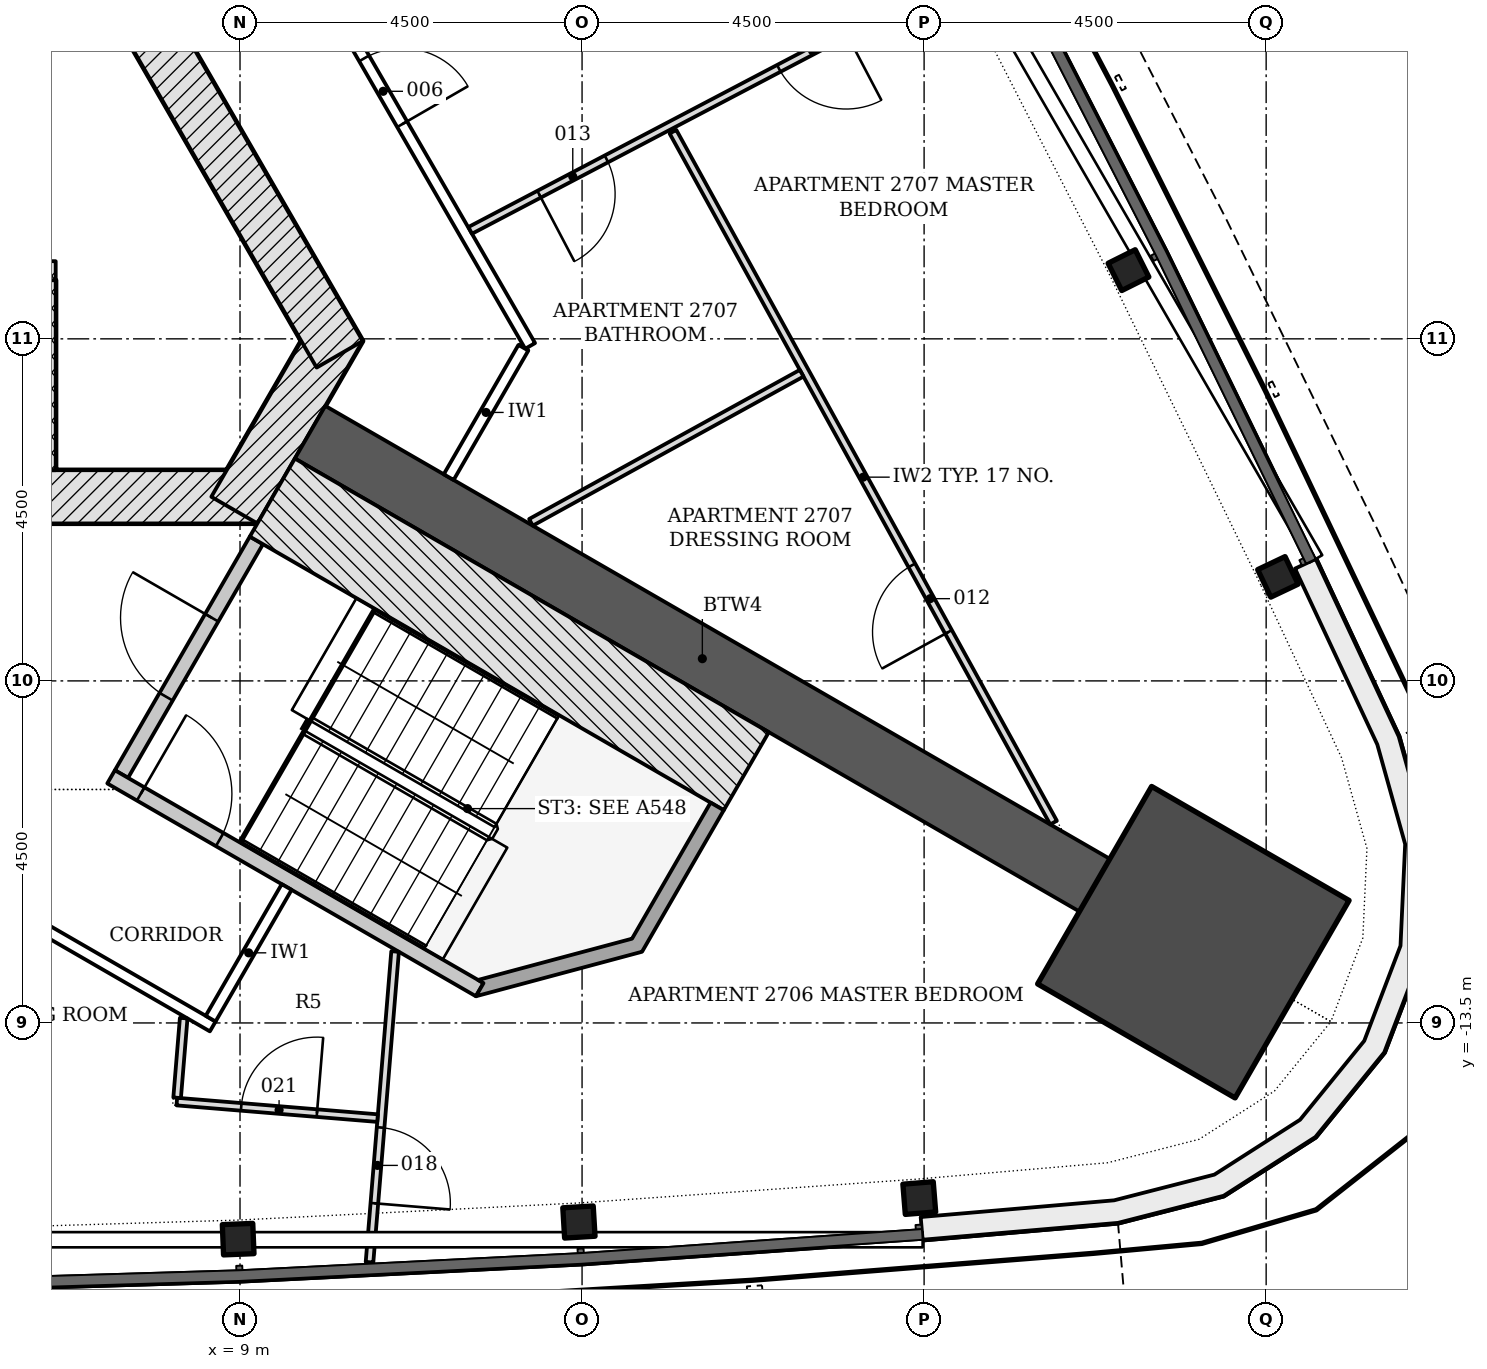
"""IFC4 building model, lengths in metres.
Left out: names, types, materials, properties, quantities, classifications, styles, units other than length and angle.
Written with IfcOpenShell. Run it as: python <this file> out.ifc"""

import sys

from ifc_helpers import new_model, si_unit, direction, frame, frame_2d, origin, origin_2d, place, context, subcontext, project, spatial, polyline, rectangle, i_section, outline, extrude, element, fill, save


model = new_model("IFC4")
c1 = context("Model", 3, precision=1e-05, world=origin(), true_north=direction((0.0, 1.0)))
c2 = subcontext(c1, "Body", "Model", "MODEL_VIEW")
j1 = project(units=[si_unit("LENGTHUNIT", "METRE"), si_unit("PLANEANGLEUNIT", "RADIAN")], contexts=[c1])
p1 = place(None, origin())
s1 = spatial("IfcSite", under=j1, at=p1, CompositionType="ELEMENT")
p2 = place(p1, origin())
s2 = spatial("IfcBuilding", under=s1, at=p2, CompositionType="ELEMENT")
p3 = place(p2, frame((0.0, 0.0, 105.9)))
s3 = spatial("IfcBuildingStorey", under=s2, at=p3, CompositionType="ELEMENT", Elevation=105.9)
p4 = place(p3, frame((-9.229, -6.578, -0.2), z_axis=(0.0, 0.0, 1.0), x_axis=(1.0, 0.0, 0.0)))
e1 = element("IfcWall", 1, at=p4, inside=s3, PredefinedType="SHEAR", context=c2, shape_type="SweptSolid", body=[
    extrude(rectangle(XDim=18.458, YDim=0.7, at=frame_2d((9.229, 0.0))), origin(), (0.0, 0.0, 1.0), 3.6),
])
p5 = place(p4, frame((3.304, 0.0, 0.2)))
e2 = element("IfcOpeningElement", 2, at=p5, cuts=e1, PredefinedType="OPENING", context=c2, shape_type="SweptSolid", body=[
    extrude(rectangle(XDim=1.1, YDim=2.1, at=frame_2d((0.55, 1.05))), frame((0.0, 0.36, 0.0), z_axis=(0.0, -1.0, 0.0), x_axis=(1.0, 0.0, 0.0)), (0.0, 0.0, 1.0), 0.72),
])
p6 = place(p4, frame((5.454, 0.0, 0.2)))
e3 = element("IfcOpeningElement", 3, at=p6, cuts=e1, PredefinedType="OPENING", context=c2, shape_type="SweptSolid", body=[
    extrude(rectangle(XDim=1.1, YDim=2.1, at=frame_2d((0.55, 1.05))), frame((0.0, 0.36, 0.0), z_axis=(0.0, -1.0, 0.0), x_axis=(1.0, 0.0, 0.0)), (0.0, 0.0, 1.0), 0.72),
])
p7 = place(p4, frame((7.604, 0.0, 0.2)))
e4 = element("IfcOpeningElement", 4, at=p7, cuts=e1, PredefinedType="OPENING", context=c2, shape_type="SweptSolid", body=[
    extrude(rectangle(XDim=1.1, YDim=2.1, at=frame_2d((0.55, 1.05))), frame((0.0, 0.36, 0.0), z_axis=(0.0, -1.0, 0.0), x_axis=(1.0, 0.0, 0.0)), (0.0, 0.0, 1.0), 0.72),
])
p8 = place(p4, frame((9.754, 0.0, 0.2)))
e5 = element("IfcOpeningElement", 5, at=p8, cuts=e1, PredefinedType="OPENING", context=c2, shape_type="SweptSolid", body=[
    extrude(rectangle(XDim=1.1, YDim=2.1, at=frame_2d((0.55, 1.05))), frame((0.0, 0.36, 0.0), z_axis=(0.0, -1.0, 0.0), x_axis=(1.0, 0.0, 0.0)), (0.0, 0.0, 1.0), 0.72),
])
p9 = place(p4, frame((11.904, 0.0, 0.2)))
e6 = element("IfcOpeningElement", 6, at=p9, cuts=e1, PredefinedType="OPENING", context=c2, shape_type="SweptSolid", body=[
    extrude(rectangle(XDim=1.1, YDim=2.1, at=frame_2d((0.55, 1.05))), frame((0.0, 0.36, 0.0), z_axis=(0.0, -1.0, 0.0), x_axis=(1.0, 0.0, 0.0)), (0.0, 0.0, 1.0), 0.72),
])
p10 = place(p4, frame((14.054, 0.0, 0.2)))
e7 = element("IfcOpeningElement", 7, at=p10, cuts=e1, PredefinedType="OPENING", context=c2, shape_type="SweptSolid", body=[
    extrude(rectangle(XDim=1.1, YDim=2.1, at=frame_2d((0.55, 1.05))), frame((0.0, 0.36, 0.0), z_axis=(0.0, -1.0, 0.0), x_axis=(1.0, 0.0, 0.0)), (0.0, 0.0, 1.0), 0.72),
])
p11 = place(p4, frame((1.029, 0.0, 0.2)))
e8 = element("IfcOpeningElement", 8, at=p11, cuts=e1, PredefinedType="OPENING", context=c2, shape_type="SweptSolid", body=[
    extrude(rectangle(XDim=1.0, YDim=2.1, at=frame_2d((0.5, 1.05))), frame((0.0, 0.36, 0.0), z_axis=(0.0, -1.0, 0.0), x_axis=(1.0, 0.0, 0.0)), (0.0, 0.0, 1.0), 0.72),
])
p12 = place(p3, frame((8.926, -6.753, -0.2), z_axis=(0.0, 0.0, 1.0), x_axis=(0.500042739161, 0.866000726912, 0.0)))
e9 = element("IfcWall", 9, at=p12, inside=s3, PredefinedType="SHEAR", context=c2, shape_type="SweptSolid", body=[
    extrude(rectangle(XDim=2.771, YDim=0.7, at=frame_2d((1.386, 0.0))), origin(), (0.0, 0.0, 1.0), 3.6),
])
p13 = place(p3, frame((10.311, -4.703, -0.2), z_axis=(0.0, 0.0, 1.0), x_axis=(-0.500001446645, 0.866024568562, 0.0)))
e10 = element("IfcWall", 10, at=p13, inside=s3, PredefinedType="SHEAR", context=c2, shape_type="SweptSolid", body=[
    extrude(rectangle(XDim=18.458, YDim=0.7, at=frame_2d((9.229, 0.0))), origin(), (0.0, 0.0, 1.0), 3.6),
])
p14 = place(p13, frame((10.5, 0.0, 0.2)))
e11 = element("IfcOpeningElement", 11, at=p14, cuts=e10, PredefinedType="OPENING", context=c2, shape_type="SweptSolid", body=[
    extrude(rectangle(XDim=1.0, YDim=2.1, at=frame_2d((0.5, 1.05))), frame((0.0, 0.36, 0.0), z_axis=(0.0, -1.0, 0.0), x_axis=(1.0, 0.0, 0.0)), (0.0, 0.0, 1.0), 0.72),
])
p15 = place(p13, frame((4.877, 0.0, 0.2)))
e12 = element("IfcOpeningElement", 12, at=p15, cuts=e10, PredefinedType="OPENING", context=c2, shape_type="SweptSolid", body=[
    extrude(rectangle(XDim=0.9, YDim=2.1, at=frame_2d((0.45, 1.05))), frame((0.0, 0.36, 0.0), z_axis=(0.0, -1.0, 0.0), x_axis=(1.0, 0.0, 0.0)), (0.0, 0.0, 1.0), 0.72),
])
p16 = place(p13, frame((14.452, 0.0, 0.2)))
e13 = element("IfcOpeningElement", 13, at=p16, cuts=e10, PredefinedType="OPENING", context=c2, shape_type="SweptSolid", body=[
    extrude(rectangle(XDim=0.9, YDim=2.1, at=frame_2d((0.45, 1.05))), frame((0.0, 0.36, 0.0), z_axis=(0.0, -1.0, 0.0), x_axis=(1.0, 0.0, 0.0)), (0.0, 0.0, 1.0), 0.72),
])
p17 = place(p3, frame((9.922, -5.728, -0.2), z_axis=(0.0, 0.0, 1.0), x_axis=(0.866027307971, -0.499996701837, 0.0)))
e14 = element("IfcWall", 14, at=p17, inside=s3, PredefinedType="SHEAR", context=c2, shape_type="SweptSolid", body=[
    extrude(rectangle(XDim=11.918, YDim=0.8, at=frame_2d((5.959, 0.0))), origin(), (0.0, 0.0, 1.0), 3.6),
])
p18 = place(p3, frame((21.542, -12.438, -0.2), z_axis=(0.0, 0.0, 1.0), x_axis=(0.866025403784, -0.5, 0.0)))
e15 = element("IfcColumn", 15, at=p18, inside=s3, PredefinedType="COLUMN", context=c2, shape_type="SweptSolid", body=[
    extrude(rectangle(XDim=3.0, YDim=3.0, at=origin_2d()), origin(), (0.0, 0.0, 1.0), 3.6),
])
for number, where, z_axis, x_axis in (
    (16, (8.976, -16.344, -0.2), (0.0, 0.0, 1.0), (0.999, 0.04, 0.0)),
    (17, (13.459, -16.119, -0.2), (0.0, 0.0, 1.0), (0.998, 0.06, 0.0)),
    (18, (17.937, -15.804, -0.2), (0.0, 0.0, 1.0), (0.997, 0.08, 0.0)),
    (19, (22.655, -7.632, -0.2), (0.0, 0.0, 1.0), (-0.429, 0.903, 0.0)),
    (20, (20.689, -3.596, -0.2), (0.0, 0.0, 1.0), (-0.447, 0.895, 0.0)),
):
    element("IfcColumn", number, at=place(p3, frame(where, z_axis=z_axis, x_axis=x_axis)), inside=s3, PredefinedType="COLUMN", context=c2, shape_type="SweptSolid", body=[
        extrude(i_section(OverallWidth=0.401, OverallDepth=0.399, WebThickness=0.025, FlangeThickness=0.04, FilletRadius=0.015, at=origin_2d()), origin(), (0.0, 0.0, 1.0), 3.6),
    ])
p19 = place(p3, origin())
e21 = element("IfcWall", 21, at=p19, inside=s3, PredefinedType="NOTDEFINED", context=c2, shape_type="SweptSolid", body=[
    extrude(outline(polyline([(17.981, -16.352), (20.551, -16.13), (21.94, -15.774), (23.148, -15.0), (24.054, -13.887), (24.565, -12.547), (24.631, -11.114), (24.245, -9.732), (23.152, -7.396), (22.88, -7.523), (23.962, -9.837), (24.329, -11.148), (24.267, -12.485), (23.791, -13.735), (22.946, -14.774), (21.819, -15.495), (20.5, -15.833), (17.955, -16.053), (17.981, -16.352)])), origin(), (0.0, 0.0, 1.0), 3.3),
])
p20 = place(p3, frame((6.45, -6.228, -0.2), z_axis=(0.0, 0.0, 1.0), x_axis=(0.0, 1.0, 0.0)))
e22 = element("IfcWall", 22, at=p20, inside=s3, PredefinedType="PARTITIONING", context=c2, shape_type="SweptSolid", body=[
    extrude(rectangle(XDim=2.5, YDim=0.25, at=frame_2d((1.25, 0.0))), origin(), (0.0, 0.0, 1.0), 3.6),
])
p21 = place(p3, frame((-6.575, -3.603, 0.0), z_axis=(0.0, 0.0, 1.0), x_axis=(1.0, 0.0, 0.0)))
e23 = element("IfcWall", 23, at=p21, inside=s3, PredefinedType="PARTITIONING", context=c2, shape_type="SweptSolid", body=[
    extrude(rectangle(XDim=13.15, YDim=0.25, at=frame_2d((6.575, 0.0))), origin(), (0.0, 0.0, 1.0), 3.4),
])
p22 = place(p3, frame((7.44, -10.226, -0.2), z_axis=(0.0, 0.0, 1.0), x_axis=(0.500022077904, 0.866012656725, 0.0)))
e24 = element("IfcWall", 24, at=p22, inside=s3, PredefinedType="SHEAR", context=c2, shape_type="SweptSolid", body=[
    extrude(rectangle(XDim=3.55, YDim=0.2, at=frame_2d((1.775, 0.0))), origin(), (0.0, 0.0, 1.0), 3.6),
])
p23 = place(p22, frame((1.175, 0.0, 0.2)))
e25 = element("IfcOpeningElement", 25, at=p23, cuts=e24, PredefinedType="OPENING", context=c2, shape_type="SweptSolid", body=[
    extrude(rectangle(XDim=1.2, YDim=2.1, at=frame_2d((0.6, 1.05))), frame((0.0, 0.11, 0.0), z_axis=(0.0, -1.0, 0.0), x_axis=(1.0, 0.0, 0.0)), (0.0, 0.0, 1.0), 0.22),
])
p24 = place(p3, frame((7.304, -10.262, -0.2), z_axis=(0.0, 0.0, 1.0), x_axis=(0.866026594901, -0.49999793692, 0.0)))
e26 = element("IfcWall", 26, at=p24, inside=s3, PredefinedType="SHEAR", context=c2, shape_type="SweptSolid", body=[
    extrude(rectangle(XDim=5.6, YDim=0.2, at=frame_2d((2.8, 0.0))), origin(), (0.0, 0.0, 1.0), 3.6),
])
p25 = place(p24, frame((0.45, 0.0, 0.2)))
e27 = element("IfcOpeningElement", 27, at=p25, cuts=e26, PredefinedType="OPENING", context=c2, shape_type="SweptSolid", body=[
    extrude(rectangle(XDim=1.2, YDim=2.1, at=frame_2d((0.6, 1.05))), frame((0.0, 0.11, 0.0), z_axis=(0.0, -1.0, 0.0), x_axis=(1.0, 0.0, 0.0)), (0.0, 0.0, 1.0), 0.22),
])
p26 = place(p3, frame((9.425, -6.588, -0.2), z_axis=(0.0, 0.0, 1.0), x_axis=(0.866018442252, -0.500012057535, 0.0)))
e28 = element("IfcWall", 28, at=p26, inside=s3, PredefinedType="SHEAR", context=c2, shape_type="SweptSolid", body=[
    extrude(rectangle(XDim=7.2, YDim=1.186, at=frame_2d((3.6, 0.0))), origin(), (0.0, 0.0, 1.0), 3.6),
])
p27 = place(p3, frame((0.0, 0.0, -0.2)))
e29 = element("IfcWall", 29, at=p27, inside=s3, PredefinedType="SHEAR", context=c2, shape_type="SweptSolid", body=[
    extrude(outline(polyline([(12.104, -13.149), (14.289, -12.563), (15.364, -10.701), (15.191, -10.601), (14.157, -12.392), (12.132, -12.934), (12.204, -12.976), (12.204, -12.976), (12.204, -12.976), (12.204, -12.976), (12.204, -12.976), (12.204, -12.976), (12.204, -12.976), (12.204, -12.976), (12.204, -12.976), (12.204, -12.976), (12.204, -12.976), (12.204, -12.976), (12.204, -12.976), (12.204, -12.976), (12.204, -12.976), (12.204, -12.976), (12.204, -12.976), (12.104, -13.149)])), origin(), (0.0, 0.0, 1.0), 3.6),
])
p28 = place(p3, frame((5.289, 8.446, 0.0), z_axis=(0.0, 0.0, 1.0), x_axis=(0.499996620721, -0.866027354803, 0.0)))
e30 = element("IfcWall", 30, at=p28, inside=s3, PredefinedType="PARTITIONING", context=c2, shape_type="SweptSolid", body=[
    extrude(rectangle(XDim=15.057, YDim=0.15, at=frame_2d((7.528, 0.0))), origin(), (0.0, 0.0, 1.0), 2.847),
])
p29 = place(p28, frame((10.689, 0.0, 0.0)))
e31 = element("IfcOpeningElement", 31, at=p29, cuts=e30, PredefinedType="OPENING", context=c2, shape_type="SweptSolid", body=[
    extrude(rectangle(XDim=1.0, YDim=2.1, at=frame_2d((0.5, 1.05))), frame((0.0, 0.085, 0.0), z_axis=(0.0, -1.0, 0.0), x_axis=(1.0, 0.0, 0.0)), (0.0, 0.0, 1.0), 0.17),
])
p30 = place(p28, frame((4.695, 0.0, 0.0)))
e32 = element("IfcOpeningElement", 32, at=p30, cuts=e30, PredefinedType="OPENING", context=c2, shape_type="SweptSolid", body=[
    extrude(rectangle(XDim=1.0, YDim=2.1, at=frame_2d((0.5, 1.05))), frame((0.0, 0.085, 0.0), z_axis=(0.0, -1.0, 0.0), x_axis=(1.0, 0.0, 0.0)), (0.0, 0.0, 1.0), 0.17),
])
p31 = place(p3, frame((8.641, -13.546, 0.0), z_axis=(0.0, 0.0, 1.0), x_axis=(-0.866042728627, 0.499969991291, 0.0)))
e33 = element("IfcWall", 33, at=p31, inside=s3, PredefinedType="PARTITIONING", context=c2, shape_type="SweptSolid", body=[
    extrude(rectangle(XDim=5.805, YDim=0.15, at=frame_2d((2.903, 0.0))), origin(), (0.0, 0.0, 1.0), 2.847),
])
p32 = place(p31, frame((2.616, 0.0, 0.0)))
e34 = element("IfcOpeningElement", 34, at=p32, cuts=e33, PredefinedType="OPENING", context=c2, shape_type="SweptSolid", body=[
    extrude(rectangle(XDim=1.0, YDim=2.1, at=frame_2d((0.5, 1.05))), frame((0.0, 0.085, 0.0), z_axis=(0.0, -1.0, 0.0), x_axis=(1.0, 0.0, 0.0)), (0.0, 0.0, 1.0), 0.17),
])
p33 = place(p3, frame((8.614, -13.444, 0.0), z_axis=(0.0, 0.0, 1.0), x_axis=(0.499972520799, 0.866041268327, 0.0)))
e35 = element("IfcWall", 35, at=p33, inside=s3, PredefinedType="PARTITIONING", context=c2, shape_type="SweptSolid", body=[
    extrude(rectangle(XDim=2.0, YDim=0.15, at=frame_2d((1.0, 0.0))), origin(), (0.0, 0.0, 1.0), 2.923),
])
p34 = place(p3, frame((11.745, -6.319, 0.0), z_axis=(0.0, 0.0, 1.0), x_axis=(0.500012721296, 0.866018059016, 0.0)))
e36 = element("IfcWall", 36, at=p34, inside=s3, PredefinedType="PARTITIONING", context=c2, shape_type="SweptSolid", body=[
    extrude(rectangle(XDim=1.966, YDim=0.15, at=frame_2d((0.983, 0.0))), origin(), (0.0, 0.0, 1.0), 3.4),
])
p35 = place(p3, frame((19.703, -10.864, 0.0), z_axis=(0.0, 0.0, 1.0), x_axis=(-0.482505676042, 0.875892843096, 0.0)))
e37 = element("IfcWall", 37, at=p35, inside=s3, PredefinedType="PARTITIONING", context=c2, shape_type="SweptSolid", body=[
    extrude(rectangle(XDim=10.377, YDim=0.1, at=frame_2d((5.188, 0.0))), origin(), (0.0, 0.0, 1.0), 2.847),
])
p36 = place(p35, frame((2.864, 0.0, 0.0)))
e38 = element("IfcOpeningElement", 38, at=p36, cuts=e37, PredefinedType="OPENING", context=c2, shape_type="SweptSolid", body=[
    extrude(rectangle(XDim=1.0, YDim=2.1, at=frame_2d((0.5, 1.05))), frame((0.0, 0.06, 0.0), z_axis=(0.0, -1.0, 0.0), x_axis=(1.0, 0.0, 0.0)), (0.0, 0.0, 1.0), 0.12),
])
p37 = place(p3, frame((18.421, 0.283, 0.0), z_axis=(0.0, 0.0, 1.0), x_axis=(-0.885392336097, -0.464844502151, 0.0)))
e39 = element("IfcWall", 39, at=p37, inside=s3, PredefinedType="PARTITIONING", context=c2, shape_type="SweptSolid", body=[
    extrude(rectangle(XDim=7.22, YDim=0.1, at=frame_2d((3.61, 0.0))), origin(), (0.0, 0.0, 1.0), 2.847),
])
p38 = place(p37, frame((5.196, 0.0, 0.0)))
e40 = element("IfcOpeningElement", 40, at=p38, cuts=e39, PredefinedType="OPENING", context=c2, shape_type="SweptSolid", body=[
    extrude(rectangle(XDim=1.0, YDim=2.1, at=frame_2d((0.5, 1.05))), frame((0.0, 0.06, 0.0), z_axis=(0.0, -1.0, 0.0), x_axis=(1.0, 0.0, 0.0)), (0.0, 0.0, 1.0), 0.12),
])
p39 = place(p37, frame((1.634, 0.0, 0.0)))
e41 = element("IfcOpeningElement", 41, at=p39, cuts=e39, PredefinedType="OPENING", context=c2, shape_type="SweptSolid", body=[
    extrude(rectangle(XDim=1.0, YDim=2.1, at=frame_2d((0.5, 1.05))), frame((0.0, 0.06, 0.0), z_axis=(0.0, -1.0, 0.0), x_axis=(1.0, 0.0, 0.0)), (0.0, 0.0, 1.0), 0.12),
])
p40 = place(p3, frame((16.389, -4.952, 0.0), z_axis=(0.0, 0.0, 1.0), x_axis=(-0.875896259157, -0.482499474814, 0.0)))
e42 = element("IfcWall", 42, at=p40, inside=s3, PredefinedType="PARTITIONING", context=c2, shape_type="SweptSolid", body=[
    extrude(rectangle(XDim=4.066, YDim=0.1, at=frame_2d((2.033, 0.0))), origin(), (0.0, 0.0, 1.0), 3.4),
])
p41 = place(p3, frame((11.04, -12.56, 0.0), z_axis=(0.0, 0.0, 1.0), x_axis=(-0.08207509454, -0.996626147989, 0.0)))
e43 = element("IfcWall", 43, at=p41, inside=s3, PredefinedType="PARTITIONING", context=c2, shape_type="SweptSolid", body=[
    extrude(rectangle(XDim=4.102, YDim=0.1, at=frame_2d((2.051, 0.0))), origin(), (0.0, 0.0, 1.0), 2.974),
])
p42 = place(p41, frame((2.324, 0.0, 0.0)))
e44 = element("IfcOpeningElement", 44, at=p42, cuts=e43, PredefinedType="OPENING", context=c2, shape_type="SweptSolid", body=[
    extrude(rectangle(XDim=1.0, YDim=2.1, at=frame_2d((0.5, 1.05))), frame((0.0, 0.06, 0.0), z_axis=(0.0, -1.0, 0.0), x_axis=(1.0, 0.0, 0.0)), (0.0, 0.0, 1.0), 0.12),
])
p43 = place(p3, frame((8.168, -14.534, 0.0), z_axis=(0.0, 0.0, 1.0), x_axis=(0.996625350035, -0.082084783406, 0.0)))
e45 = element("IfcWall", 45, at=p43, inside=s3, PredefinedType="PARTITIONING", context=c2, shape_type="SweptSolid", body=[
    extrude(rectangle(XDim=2.65, YDim=0.1, at=frame_2d((1.325, 0.0))), origin(), (0.0, 0.0, 1.0), 2.923),
])
p44 = place(p43, frame((0.85, 0.0, 0.0)))
e46 = element("IfcOpeningElement", 46, at=p44, cuts=e45, PredefinedType="OPENING", context=c2, shape_type="SweptSolid", body=[
    extrude(rectangle(XDim=1.0, YDim=2.1, at=frame_2d((0.5, 1.05))), frame((0.0, 0.06, 0.0), z_axis=(0.0, -1.0, 0.0), x_axis=(1.0, 0.0, 0.0)), (0.0, 0.0, 1.0), 0.12),
])
p45 = place(p3, frame((8.259, -13.437, 0.0), z_axis=(0.0, 0.0, 1.0), x_axis=(-0.082180892167, -0.99661742959, 0.0)))
e47 = element("IfcWall", 47, at=p45, inside=s3, PredefinedType="PARTITIONING", context=c2, shape_type="SweptSolid", body=[
    extrude(rectangle(XDim=1.052, YDim=0.1, at=frame_2d((0.526, 0.0))), origin(), (0.0, 0.0, 1.0), 3.4),
])
p46 = place(p23, origin())
e48 = element("IfcDoor", 48, at=p46, inside=s3, OperationType="SINGLE_SWING_RIGHT", PredefinedType="DOOR", context=c2, shape_type="SweptSolid", body=[
    extrude(rectangle(XDim=1.2, YDim=2.1, at=frame_2d((0.6, 1.05))), frame((0.0, 0.025, 0.0), z_axis=(0.0, -1.0, 0.0), x_axis=(1.0, 0.0, 0.0)), (0.0, 0.0, 1.0), 0.05),
])
fill(e25, e48)
p47 = place(p25, origin())
e49 = element("IfcDoor", 49, at=p47, inside=s3, OperationType="SINGLE_SWING_LEFT", PredefinedType="DOOR", context=c2, shape_type="SweptSolid", body=[
    extrude(rectangle(XDim=1.2, YDim=2.1, at=frame_2d((0.6, 1.05))), frame((0.0, 0.025, 0.0), z_axis=(0.0, -1.0, 0.0), x_axis=(1.0, 0.0, 0.0)), (0.0, 0.0, 1.0), 0.05),
])
fill(e27, e49)
p48 = place(p29, origin())
e50 = element("IfcDoor", 50, at=p48, inside=s3, OperationType="SINGLE_SWING_RIGHT", PredefinedType="DOOR", context=c2, shape_type="SweptSolid", body=[
    extrude(rectangle(XDim=1.0, YDim=2.1, at=frame_2d((0.5, 1.05))), frame((0.0, 0.025, 0.0), z_axis=(0.0, -1.0, 0.0), x_axis=(1.0, 0.0, 0.0)), (0.0, 0.0, 1.0), 0.05),
])
fill(e31, e50)
p49 = place(p36, origin())
e51 = element("IfcDoor", 51, at=p49, inside=s3, OperationType="SINGLE_SWING_LEFT", PredefinedType="DOOR", context=c2, shape_type="SweptSolid", body=[
    extrude(rectangle(XDim=1.0, YDim=2.1, at=frame_2d((0.5, 1.05))), frame((0.0, 0.025, 0.0), z_axis=(0.0, -1.0, 0.0), x_axis=(1.0, 0.0, 0.0)), (0.0, 0.0, 1.0), 0.05),
])
fill(e38, e51)
p50 = place(p38, origin())
e52 = element("IfcDoor", 52, at=p50, inside=s3, OperationType="SINGLE_SWING_RIGHT", PredefinedType="DOOR", context=c2, shape_type="SweptSolid", body=[
    extrude(rectangle(XDim=1.0, YDim=2.1, at=frame_2d((0.5, 1.05))), frame((0.0, 0.025, 0.0), z_axis=(0.0, -1.0, 0.0), x_axis=(1.0, 0.0, 0.0)), (0.0, 0.0, 1.0), 0.05),
])
fill(e40, e52)
p51 = place(p39, origin())
e53 = element("IfcDoor", 53, at=p51, inside=s3, OperationType="SINGLE_SWING_LEFT", PredefinedType="DOOR", context=c2, shape_type="SweptSolid", body=[
    extrude(rectangle(XDim=1.0, YDim=2.1, at=frame_2d((0.5, 1.05))), frame((0.0, 0.025, 0.0), z_axis=(0.0, -1.0, 0.0), x_axis=(1.0, 0.0, 0.0)), (0.0, 0.0, 1.0), 0.05),
])
fill(e41, e53)
p52 = place(p42, origin())
e54 = element("IfcDoor", 54, at=p52, inside=s3, OperationType="SINGLE_SWING_RIGHT", PredefinedType="DOOR", context=c2, shape_type="SweptSolid", body=[
    extrude(rectangle(XDim=1.0, YDim=2.1, at=frame_2d((0.5, 1.05))), frame((0.0, 0.025, 0.0), z_axis=(0.0, -1.0, 0.0), x_axis=(1.0, 0.0, 0.0)), (0.0, 0.0, 1.0), 0.05),
])
fill(e44, e54)
p53 = place(p44, origin())
e55 = element("IfcDoor", 55, at=p53, inside=s3, OperationType="SINGLE_SWING_RIGHT", PredefinedType="DOOR", context=c2, shape_type="SweptSolid", body=[
    extrude(rectangle(XDim=1.0, YDim=2.1, at=frame_2d((0.5, 1.05))), frame((0.0, 0.025, 0.0), z_axis=(0.0, -1.0, 0.0), x_axis=(1.0, 0.0, 0.0)), (0.0, 0.0, 1.0), 0.05),
])
fill(e46, e55)
save(model, sys.argv[1])
